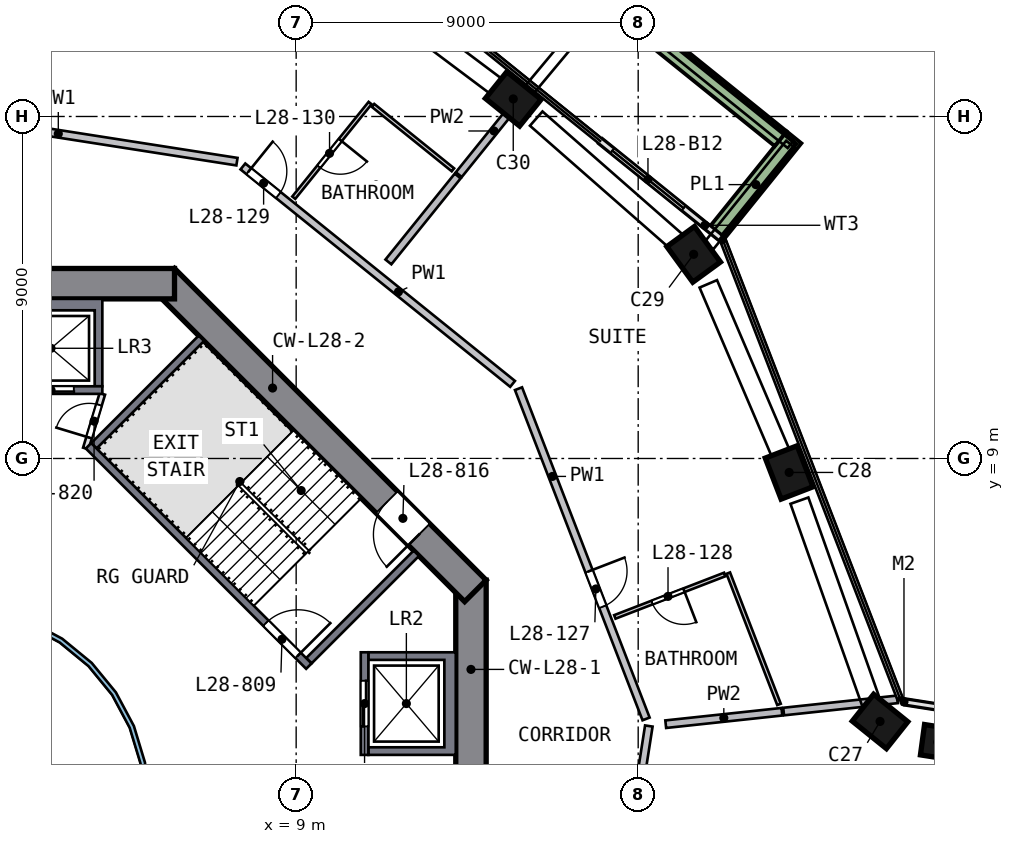
"""IFC4 building model, lengths in metres.
Left out: names, types, materials, properties, quantities, classifications, styles, units other than length and angle.
Written with IfcOpenShell. Run it as: python <this file> out.ifc"""

import sys

from ifc_helpers import new_model, si_unit, direction, frame, frame_2d, origin, origin_2d, place, context, subcontext, project, spatial, polyline, rectangle, outline, extrude, element, fill, save


model = new_model("IFC4")
c1 = context("Model", 3, precision=1e-05, world=origin(), true_north=direction((0.0, 1.0)))
c2 = subcontext(c1, "Body", "Model", "MODEL_VIEW")
j1 = project(units=[si_unit("LENGTHUNIT", "METRE"), si_unit("PLANEANGLEUNIT", "RADIAN")], contexts=[c1])
p1 = place(None, origin())
s1 = spatial("IfcSite", under=j1, at=p1, CompositionType="ELEMENT")
p2 = place(p1, origin())
s2 = spatial("IfcBuilding", under=s1, at=p2, CompositionType="ELEMENT")
p3 = place(p2, frame((0.0, 0.0, 118.5)))
s3 = spatial("IfcBuildingStorey", under=s2, at=p3, CompositionType="ELEMENT", Elevation=118.5)
p4 = place(p3, frame((26.07, 1.362, 0.0), z_axis=(-0.15242064, 0.14215314, 0.978039075), x_axis=(-0.976379461, 0.131678342, -0.171300796)))
e1 = element("IfcColumn", 1, at=p4, inside=s3, PredefinedType="COLUMN", context=c2, shape_type="SweptSolid", body=[
    extrude(rectangle(XDim=0.8, YDim=0.8, at=origin_2d()), origin(), (0.0, 0.0, 1.0), 3.067),
])
p5 = place(p3, frame((24.377, 1.94, 0.0), z_axis=(-0.01026508, 0.115906491, 0.993207085), x_axis=(0.780504995, -0.619955936, 0.080415116)))
e2 = element("IfcColumn", 2, at=p5, inside=s3, PredefinedType="COLUMN", context=c2, shape_type="SweptSolid", body=[
    extrude(rectangle(XDim=1.15, YDim=0.9, at=origin_2d()), origin(), (0.0, 0.0, 1.0), 3.021),
])
p6 = place(p3, frame((22.022, 8.507, 0.0), z_axis=(-0.041321986, 0.104477507, 0.993668428), x_axis=(-0.357606883, 0.927089617, -0.112348381)))
e3 = element("IfcColumn", 3, at=p6, inside=s3, PredefinedType="COLUMN", context=c2, shape_type="SweptSolid", body=[
    extrude(rectangle(XDim=1.15, YDim=0.9, at=origin_2d()), origin(), (0.0, 0.0, 1.0), 3.019),
])
p7 = place(p3, frame((19.542, 14.261, 0.0), z_axis=(-0.068632604, 0.092399372, 0.993353875), x_axis=(0.585531111, -0.80243765, 0.115096203)))
e4 = element("IfcColumn", 4, at=p7, inside=s3, PredefinedType="COLUMN", context=c2, shape_type="SweptSolid", body=[
    extrude(rectangle(XDim=1.15, YDim=0.9, at=origin_2d()), origin(), (0.0, 0.0, 1.0), 3.02),
])
p8 = place(p3, frame((14.819, 18.378, 0.0), z_axis=(-0.087981597, 0.069786874, 0.99367451), x_axis=(-0.773238231, 0.624093395, -0.11229458)))
e5 = element("IfcColumn", 5, at=p8, inside=s3, PredefinedType="COLUMN", context=c2, shape_type="SweptSolid", body=[
    extrude(rectangle(XDim=1.15, YDim=0.9, at=origin_2d()), origin(), (0.0, 0.0, 1.0), 3.019),
])
p9 = place(p3, frame((13.6, -5.799, 0.0), z_axis=(0.0, 0.0, 1.0), x_axis=(0.0, 1.0, 0.0)))
e6 = element("IfcWall", 6, at=p9, inside=s3, PredefinedType="SHEAR", context=c2, shape_type="SweptSolid", body=[
    extrude(rectangle(XDim=11.598, YDim=0.8, at=frame_2d((5.799, 0.0))), origin(), (0.0, 0.0, 1.0), 3.5),
])
p10 = place(p9, frame((4.899, 0.0, 0.0)))
e7 = element("IfcOpeningElement", 7, at=p10, cuts=e6, PredefinedType="OPENING", context=c2, shape_type="SweptSolid", body=[
    extrude(rectangle(XDim=1.8, YDim=2.1, at=frame_2d((0.9, 1.05))), frame((0.0, 0.41, 0.0), z_axis=(0.0, -1.0, 0.0), x_axis=(1.0, 0.0, 0.0)), (0.0, 0.0, 1.0), 0.82),
])
p11 = place(p3, frame((13.717, 5.516, 0.0), z_axis=(0.0, 0.0, 1.0), x_axis=(-0.707106781, 0.707106781, 0.0)))
e8 = element("IfcWall", 8, at=p11, inside=s3, PredefinedType="SHEAR", context=c2, shape_type="SweptSolid", body=[
    extrude(rectangle(XDim=11.598, YDim=0.8, at=frame_2d((5.799, 0.0))), origin(), (0.0, 0.0, 1.0), 3.5),
])
p12 = place(p11, frame((2.099, 0.0, 0.0)))
e9 = element("IfcOpeningElement", 9, at=p12, cuts=e8, PredefinedType="OPENING", context=c2, shape_type="SweptSolid", body=[
    extrude(rectangle(XDim=1.2, YDim=2.1, at=frame_2d((0.6, 1.05))), frame((0.0, 0.41, 0.0), z_axis=(0.0, -1.0, 0.0), x_axis=(1.0, 0.0, 0.0)), (0.0, 0.0, 1.0), 0.82),
])
p13 = place(p3, frame((5.799, 13.6, 0.0), z_axis=(0.0, 0.0, 1.0), x_axis=(-1.0, 0.0, 0.0)))
e10 = element("IfcWall", 10, at=p13, inside=s3, PredefinedType="SHEAR", context=c2, shape_type="SweptSolid", body=[
    extrude(rectangle(XDim=11.598, YDim=0.8, at=frame_2d((5.799, 0.0))), origin(), (0.0, 0.0, 1.0), 3.5),
])
p14 = place(p13, frame((4.899, 0.0, 0.0)))
e11 = element("IfcOpeningElement", 11, at=p14, cuts=e10, PredefinedType="OPENING", context=c2, shape_type="SweptSolid", body=[
    extrude(rectangle(XDim=1.8, YDim=2.1, at=frame_2d((0.9, 1.05))), frame((0.0, 0.41, 0.0), z_axis=(0.0, -1.0, 0.0), x_axis=(1.0, 0.0, 0.0)), (0.0, 0.0, 1.0), 0.82),
])
p15 = place(p3, frame((26.677, 2.335, 0.0), z_axis=(0.0, 0.0, 1.0), x_axis=(-0.988012034, 0.15437688, 0.0)))
e12 = element("IfcWall", 12, at=p15, inside=s3, PredefinedType="SOLIDWALL", context=c2, shape_type="SweptSolid", body=[
    extrude(rectangle(XDim=1.668, YDim=0.15, at=frame_2d((0.834, 0.0))), origin(), (0.0, 0.0, 1.0), 2.935),
])
p16 = place(p3, frame((20.162, 14.809, 0.0), z_axis=(0.0, 0.0, 1.0), x_axis=(-0.778437766, 0.627721789, 0.0)))
e13 = element("IfcWall", 13, at=p16, inside=s3, PredefinedType="SOLIDWALL", context=c2, shape_type="SweptSolid", body=[
    extrude(rectangle(XDim=4.046, YDim=0.15, at=frame_2d((2.023, 0.0))), origin(), (0.0, 0.0, 1.0), 2.935),
])
p17 = place(p16, frame((1.247, 0.0, 0.0)))
e14 = element("IfcOpeningElement", 14, at=p17, cuts=e13, PredefinedType="OPENING", context=c2, shape_type="SweptSolid", body=[
    extrude(rectangle(XDim=2.4, YDim=2.4, at=frame_2d((1.2, 1.2))), frame((0.0, 0.085, 0.0), z_axis=(0.0, -1.0, 0.0), x_axis=(1.0, 0.0, 0.0)), (0.0, 0.0, 1.0), 0.17),
])
p18 = place(p3, frame((20.093, 14.962, 0.0), z_axis=(0.0, 0.0, 1.0), x_axis=(0.627715158, 0.778443113, 0.0)))
e15 = element("IfcWall", 15, at=p18, inside=s3, PredefinedType="SOLIDWALL", context=c2, shape_type="SweptSolid", body=[
    extrude(rectangle(XDim=3.199, YDim=0.5, at=frame_2d((1.6, 0.0))), origin(), (0.0, 0.0, 1.0), 0.7),
])
p19 = place(p3, frame((21.749, 17.415, 0.0), z_axis=(0.0, 0.0, 1.0), x_axis=(-0.778460183, 0.627693988, 0.0)))
e16 = element("IfcWall", 16, at=p19, inside=s3, PredefinedType="SOLIDWALL", context=c2, shape_type="SweptSolid", body=[
    extrude(rectangle(XDim=13.223, YDim=0.5, at=frame_2d((6.612, 0.0))), origin(), (0.0, 0.0, 1.0), 0.7),
])
p20 = place(p3, origin())
e17 = element("IfcWall", 17, at=p20, inside=s3, PredefinedType="SOLIDWALL", context=c2, shape_type="SweptSolid", body=[
    extrude(outline(polyline([(13.2, 3.9), (13.2, 1.2), (10.9, 1.2), (10.9, 1.4), (12.9, 1.4), (12.9, 3.7), (10.9, 3.7), (10.9, 3.9), (13.2, 3.9)])), origin(), (0.0, 0.0, 1.0), 3.0),
])
p21 = place(p3, frame((10.8, 1.2, 0.0), z_axis=(0.0, 0.0, 1.0), x_axis=(0.0, 1.0, 0.0)))
e18 = element("IfcWall", 18, at=p21, inside=s3, PredefinedType="SOLIDWALL", context=c2, shape_type="SweptSolid", body=[
    extrude(rectangle(XDim=2.7, YDim=0.2, at=frame_2d((1.35, 0.0))), origin(), (0.0, 0.0, 1.0), 3.0),
])
p22 = place(p21, frame((0.75, 0.0, 0.0)))
e19 = element("IfcOpeningElement", 19, at=p22, cuts=e18, PredefinedType="OPENING", context=c2, shape_type="SweptSolid", body=[
    extrude(rectangle(XDim=1.2, YDim=2.1, at=frame_2d((0.6, 1.05))), frame((0.0, 0.11, 0.0), z_axis=(0.0, -1.0, 0.0), x_axis=(1.0, 0.0, 0.0)), (0.0, 0.0, 1.0), 0.22),
])
p23 = place(p3, origin())
e20 = element("IfcWall", 20, at=p23, inside=s3, PredefinedType="SOLIDWALL", context=c2, shape_type="SweptSolid", body=[
    extrude(outline(polyline([(3.9, 13.2), (3.9, 10.9), (3.7, 10.9), (3.7, 12.9), (1.4, 12.9), (1.4, 10.9), (1.2, 10.9), (1.2, 13.2), (3.9, 13.2)])), origin(), (0.0, 0.0, 1.0), 3.0),
])
p24 = place(p3, frame((1.2, 10.8, 0.0), z_axis=(0.0, 0.0, 1.0), x_axis=(1.0, 0.0, 0.0)))
e21 = element("IfcWall", 21, at=p24, inside=s3, PredefinedType="SOLIDWALL", context=c2, shape_type="SweptSolid", body=[
    extrude(rectangle(XDim=2.7, YDim=0.2, at=frame_2d((1.35, 0.0))), origin(), (0.0, 0.0, 1.0), 3.0),
])
p25 = place(p24, frame((0.75, 0.0, 0.0)))
e22 = element("IfcOpeningElement", 22, at=p25, cuts=e21, PredefinedType="OPENING", context=c2, shape_type="SweptSolid", body=[
    extrude(rectangle(XDim=1.2, YDim=2.1, at=frame_2d((0.6, 1.05))), frame((0.0, 0.11, 0.0), z_axis=(0.0, -1.0, 0.0), x_axis=(1.0, 0.0, 0.0)), (0.0, 0.0, 1.0), 0.22),
])
p26 = place(p3, frame((3.535, 9.334, 0.0), z_axis=(0.0, 0.0, 1.0), x_axis=(0.707106781, -0.707106781, 0.0)))
e23 = element("IfcWall", 23, at=p26, inside=s3, PredefinedType="SOLIDWALL", context=c2, shape_type="SweptSolid", body=[
    extrude(rectangle(XDim=8.2, YDim=0.2, at=frame_2d((4.1, 0.0))), origin(), (0.0, 0.0, 1.0), 3.0),
])
p27 = place(p26, frame((6.6, 0.0, 0.0)))
e24 = element("IfcOpeningElement", 24, at=p27, cuts=e23, PredefinedType="OPENING", context=c2, shape_type="SweptSolid", body=[
    extrude(rectangle(XDim=1.2, YDim=2.1, at=frame_2d((0.6, 1.05))), frame((0.0, 0.11, 0.0), z_axis=(0.0, -1.0, 0.0), x_axis=(1.0, 0.0, 0.0)), (0.0, 0.0, 1.0), 0.22),
])
for number, where, z_axis, x_axis in (
    (25, (9.334, 3.677, 0.0), (0.0, 0.0, 1.0), (0.707, 0.707, 0.0)),
    (26, (3.677, 9.334, 0.0), (0.0, 0.0, 1.0), (0.707, 0.707, 0.0)),
):
    element("IfcWall", number, at=place(p3, frame(where, z_axis=z_axis, x_axis=x_axis)), inside=s3, PredefinedType="SOLIDWALL", context=c2, shape_type="SweptSolid", body=[
        extrude(rectangle(XDim=4.0, YDim=0.2, at=frame_2d((2.0, 0.0))), origin(), (0.0, 0.0, 1.0), 3.0),
    ])
p28 = place(p3, frame((3.465, 9.263, 0.0), z_axis=(0.0, 0.0, 1.0), x_axis=(0.289808785, 0.957084567, 0.0)))
e27 = element("IfcWall", 27, at=p28, inside=s3, PredefinedType="PARTITIONING", context=c2, shape_type="SweptSolid", body=[
    extrude(rectangle(XDim=1.501, YDim=0.15, at=frame_2d((0.75, 0.0))), origin(), (0.0, 0.0, 1.0), 3.0),
])
p29 = place(p28, frame((0.301, 0.0, 0.0)))
e28 = element("IfcOpeningElement", 28, at=p29, cuts=e27, PredefinedType="OPENING", context=c2, shape_type="SweptSolid", body=[
    extrude(rectangle(XDim=0.9, YDim=2.1, at=frame_2d((0.45, 1.05))), frame((0.0, 0.085, 0.0), z_axis=(0.0, -1.0, 0.0), x_axis=(1.0, 0.0, 0.0)), (0.0, 0.0, 1.0), 0.17),
])
p30 = place(p3, origin())
e29 = element("IfcWall", 29, at=p30, inside=s3, PredefinedType="SOLIDWALL", context=c2, shape_type="SweptSolid", body=[
    extrude(outline(polyline([(5.021, -0.999), (4.73, -1.959), (4.257, -2.844), (3.62, -3.62), (2.844, -4.257), (1.959, -4.73), (0.999, -5.021), (0.0, -5.12), (-0.999, -5.021), (-1.959, -4.73), (-2.844, -4.257), (-3.62, -3.62), (-4.257, -2.844), (-4.73, -1.959), (-5.021, -0.999), (-5.12, 0.0), (-5.021, 0.999), (-4.73, 1.959), (-4.257, 2.844), (-3.62, 3.62), (-2.844, 4.257), (-1.959, 4.73), (-0.999, 5.021), (0.0, 5.12), (0.999, 5.021), (1.959, 4.73), (2.844, 4.257), (3.62, 3.62), (4.257, 2.844), (4.73, 1.959), (5.021, 0.999), (5.12, 0.0), (5.021, -0.999)]), holes=[polyline([(4.904, 0.976), (4.619, 1.913), (4.157, 2.778), (3.535, 3.535), (2.778, 4.157), (1.913, 4.619), (0.976, 4.904), (0.0, 5.0), (-0.976, 4.904), (-1.913, 4.619), (-2.778, 4.157), (-3.535, 3.535), (-4.157, 2.778), (-4.619, 1.913), (-4.904, 0.976), (-5.0, 0.0), (-4.904, -0.976), (-4.619, -1.913), (-4.157, -2.778), (-3.535, -3.535), (-2.778, -4.157), (-1.913, -4.619), (-0.976, -4.904), (0.0, -5.0), (0.976, -4.904), (1.913, -4.619), (2.778, -4.157), (3.535, -3.535), (4.157, -2.778), (4.619, -1.913), (4.904, -0.976), (5.0, 0.0), (4.904, 0.976)])]), origin(), (0.0, 0.0, 1.0), 3.0),
])
p31 = place(p3, frame((7.442, 16.811, 0.0), z_axis=(0.0, 0.0, 1.0), x_axis=(-0.988012767, 0.154372184, 0.0)))
e30 = element("IfcWall", 30, at=p31, inside=s3, PredefinedType="SOLIDWALL", context=c2, shape_type="SweptSolid", body=[
    extrude(rectangle(XDim=9.516, YDim=0.2, at=frame_2d((4.758, 0.0))), origin(), (0.0, 0.0, 1.0), 3.0),
])
p32 = place(p3, frame((7.599, 16.685, 0.0), z_axis=(0.0, 0.0, 1.0), x_axis=(0.778469608, -0.6276823, 0.0)))
e31 = element("IfcWall", 31, at=p32, inside=s3, PredefinedType="SOLIDWALL", context=c2, shape_type="SweptSolid", body=[
    extrude(rectangle(XDim=9.115, YDim=0.2, at=frame_2d((4.558, 0.0))), origin(), (0.0, 0.0, 1.0), 3.0),
])
p33 = place(p32, frame((0.2, 0.0, 0.0)))
e32 = element("IfcOpeningElement", 32, at=p33, cuts=e31, PredefinedType="OPENING", context=c2, shape_type="SweptSolid", body=[
    extrude(rectangle(XDim=1.0, YDim=2.1, at=frame_2d((0.5, 1.05))), frame((0.0, 0.11, 0.0), z_axis=(0.0, -1.0, 0.0), x_axis=(1.0, 0.0, 0.0)), (0.0, 0.0, 1.0), 0.22),
])
p34 = place(p3, frame((14.851, 10.837, 0.0), z_axis=(0.0, 0.0, 1.0), x_axis=(0.360330872, -0.932824562, 0.0)))
e33 = element("IfcWall", 33, at=p34, inside=s3, PredefinedType="SOLIDWALL", context=c2, shape_type="SweptSolid", body=[
    extrude(rectangle(XDim=9.316, YDim=0.2, at=frame_2d((4.658, 0.0))), origin(), (0.0, 0.0, 1.0), 3.0),
])
p35 = place(p34, frame((5.15, 0.0, 0.0)))
e34 = element("IfcOpeningElement", 34, at=p35, cuts=e33, PredefinedType="OPENING", context=c2, shape_type="SweptSolid", body=[
    extrude(rectangle(XDim=1.0, YDim=2.1, at=frame_2d((0.5, 1.05))), frame((0.0, 0.11, 0.0), z_axis=(0.0, -1.0, 0.0), x_axis=(1.0, 0.0, 0.0)), (0.0, 0.0, 1.0), 0.22),
])
p36 = place(p3, frame((17.746, -1.457, 0.0), z_axis=(0.0, 0.0, 1.0), x_axis=(0.154396263, 0.988009005, 0.0)))
e35 = element("IfcWall", 35, at=p36, inside=s3, PredefinedType="SOLIDWALL", context=c2, shape_type="SweptSolid", body=[
    extrude(rectangle(XDim=3.458, YDim=0.2, at=frame_2d((1.729, 0.0))), origin(), (0.0, 0.0, 1.0), 3.0),
])
p37 = place(p3, frame((11.427, 14.172, 0.0), z_axis=(0.0, 0.0, 1.0), x_axis=(0.62768345, 0.778468681, 0.0)))
e36 = element("IfcWall", 36, at=p37, inside=s3, PredefinedType="SOLIDWALL", context=c2, shape_type="SweptSolid", body=[
    extrude(rectangle(XDim=2.905, YDim=0.2, at=frame_2d((1.452, 0.0))), origin(), (0.0, 0.0, 1.0), 3.0),
])
p38 = place(p3, frame((13.28, 16.469, 0.0), z_axis=(0.0, 0.0, 1.0), x_axis=(0.627736285, 0.778426076, 0.0)))
e37 = element("IfcWall", 37, at=p38, inside=s3, PredefinedType="SOLIDWALL", context=c2, shape_type="SweptSolid", body=[
    extrude(rectangle(XDim=2.952, YDim=0.2, at=frame_2d((1.476, 0.0))), origin(), (0.0, 0.0, 1.0), 3.0),
])
p39 = place(p3, frame((18.725, 2.008, 0.0), z_axis=(0.0, 0.0, 1.0), x_axis=(0.994307051, 0.106552748, 0.0)))
e38 = element("IfcWall", 38, at=p39, inside=s3, PredefinedType="SOLIDWALL", context=c2, shape_type="SweptSolid", body=[
    extrude(rectangle(XDim=3.075, YDim=0.2, at=frame_2d((1.538, 0.0))), origin(), (0.0, 0.0, 1.0), 3.0),
])
p40 = place(p3, frame((21.827, 2.34, 0.0), z_axis=(0.0, 0.0, 1.0), x_axis=(0.994301484, 0.106604684, 0.0)))
e39 = element("IfcWall", 39, at=p40, inside=s3, PredefinedType="SOLIDWALL", context=c2, shape_type="SweptSolid", body=[
    extrude(rectangle(XDim=3.011, YDim=0.2, at=frame_2d((1.506, 0.0))), origin(), (0.0, 0.0, 1.0), 3.0),
])
p41 = place(p3, frame((10.946, 18.354, 0.0), z_axis=(0.0, 0.0, 1.0), x_axis=(-0.62769578, -0.778458739, 0.0)))
e40 = element("IfcWall", 40, at=p41, inside=s3, PredefinedType="PARTITIONING", context=c2, shape_type="SweptSolid", body=[
    extrude(rectangle(XDim=3.2, YDim=0.1, at=frame_2d((1.6, 0.0))), origin(), (0.0, 0.0, 1.0), 3.0),
])
p42 = place(p41, frame((1.25, 0.0, 0.0)))
e41 = element("IfcOpeningElement", 41, at=p42, cuts=e40, PredefinedType="OPENING", context=c2, shape_type="SweptSolid", body=[
    extrude(rectangle(XDim=0.9, YDim=2.1, at=frame_2d((0.45, 1.05))), frame((0.0, 0.06, 0.0), z_axis=(0.0, -1.0, 0.0), x_axis=(1.0, 0.0, 0.0)), (0.0, 0.0, 1.0), 0.12),
])
p43 = place(p3, frame((11.023, 18.291, 0.0), z_axis=(0.0, 0.0, 1.0), x_axis=(0.778445821, -0.6277118, 0.0)))
e42 = element("IfcWall", 42, at=p43, inside=s3, PredefinedType="PARTITIONING", context=c2, shape_type="SweptSolid", body=[
    extrude(rectangle(XDim=2.7, YDim=0.1, at=frame_2d((1.35, 0.0))), origin(), (0.0, 0.0, 1.0), 3.0),
])
p44 = place(p3, frame((20.277, 5.948, 0.0), z_axis=(0.0, 0.0, 1.0), x_axis=(-0.93283724, -0.360298048, 0.0)))
e43 = element("IfcWall", 43, at=p44, inside=s3, PredefinedType="PARTITIONING", context=c2, shape_type="SweptSolid", body=[
    extrude(rectangle(XDim=3.1, YDim=0.1, at=frame_2d((1.55, 0.0))), origin(), (0.0, 0.0, 1.0), 3.0),
])
p45 = place(p44, frame((1.15, 0.0, 0.0)))
e44 = element("IfcOpeningElement", 44, at=p45, cuts=e43, PredefinedType="OPENING", context=c2, shape_type="SweptSolid", body=[
    extrude(rectangle(XDim=0.9, YDim=2.1, at=frame_2d((0.45, 1.05))), frame((0.0, 0.06, 0.0), z_axis=(0.0, -1.0, 0.0), x_axis=(1.0, 0.0, 0.0)), (0.0, 0.0, 1.0), 0.12),
])
p46 = place(p3, frame((20.371, 5.984, 0.0), z_axis=(0.0, 0.0, 1.0), x_axis=(0.360330199, -0.932824822, 0.0)))
e45 = element("IfcWall", 45, at=p46, inside=s3, PredefinedType="PARTITIONING", context=c2, shape_type="SweptSolid", body=[
    extrude(rectangle(XDim=3.704, YDim=0.1, at=frame_2d((1.852, 0.0))), origin(), (0.0, 0.0, 1.0), 3.0),
])
p47 = place(p17, origin())
e46 = element("IfcDoor", 46, at=p47, inside=s3, OperationType="SLIDING_TO_LEFT", PredefinedType="DOOR", context=c2, shape_type="SweptSolid", body=[
    extrude(rectangle(XDim=2.4, YDim=2.4, at=frame_2d((1.2, 1.2))), frame((0.0, 0.025, 0.0), z_axis=(0.0, -1.0, 0.0), x_axis=(1.0, 0.0, 0.0)), (0.0, 0.0, 1.0), 0.05),
])
fill(e14, e46)
p48 = place(p22, origin())
e47 = element("IfcDoor", 47, at=p48, inside=s3, OperationType="DOUBLE_DOOR_SLIDING", PredefinedType="DOOR", context=c2, shape_type="SweptSolid", body=[
    extrude(rectangle(XDim=1.2, YDim=2.1, at=frame_2d((0.6, 1.05))), frame((0.0, 0.025, 0.0), z_axis=(0.0, -1.0, 0.0), x_axis=(1.0, 0.0, 0.0)), (0.0, 0.0, 1.0), 0.05),
])
fill(e19, e47)
p49 = place(p25, origin())
e48 = element("IfcDoor", 48, at=p49, inside=s3, OperationType="DOUBLE_DOOR_SLIDING", PredefinedType="DOOR", context=c2, shape_type="SweptSolid", body=[
    extrude(rectangle(XDim=1.2, YDim=2.1, at=frame_2d((0.6, 1.05))), frame((0.0, 0.025, 0.0), z_axis=(0.0, -1.0, 0.0), x_axis=(1.0, 0.0, 0.0)), (0.0, 0.0, 1.0), 0.05),
])
fill(e22, e48)
p50 = place(p27, origin())
e49 = element("IfcDoor", 49, at=p50, inside=s3, OperationType="SINGLE_SWING_RIGHT", PredefinedType="DOOR", context=c2, shape_type="SweptSolid", body=[
    extrude(rectangle(XDim=1.2, YDim=2.1, at=frame_2d((0.6, 1.05))), frame((0.0, 0.025, 0.0), z_axis=(0.0, -1.0, 0.0), x_axis=(1.0, 0.0, 0.0)), (0.0, 0.0, 1.0), 0.05),
])
fill(e24, e49)
p51 = place(p12, origin())
e50 = element("IfcDoor", 50, at=p51, inside=s3, OperationType="SINGLE_SWING_LEFT", PredefinedType="DOOR", context=c2, shape_type="SweptSolid", body=[
    extrude(rectangle(XDim=1.2, YDim=2.1, at=frame_2d((0.6, 1.05))), frame((0.0, 0.025, 0.0), z_axis=(0.0, -1.0, 0.0), x_axis=(1.0, 0.0, 0.0)), (0.0, 0.0, 1.0), 0.05),
])
fill(e9, e50)
p52 = place(p29, origin())
e51 = element("IfcDoor", 51, at=p52, inside=s3, OperationType="SINGLE_SWING_LEFT", PredefinedType="DOOR", context=c2, shape_type="SweptSolid", body=[
    extrude(rectangle(XDim=0.9, YDim=2.1, at=frame_2d((0.45, 1.05))), frame((0.0, 0.025, 0.0), z_axis=(0.0, -1.0, 0.0), x_axis=(1.0, 0.0, 0.0)), (0.0, 0.0, 1.0), 0.05),
])
fill(e28, e51)
p53 = place(p35, origin())
e52 = element("IfcDoor", 52, at=p53, inside=s3, OperationType="SINGLE_SWING_LEFT", PredefinedType="DOOR", context=c2, shape_type="SweptSolid", body=[
    extrude(rectangle(XDim=1.0, YDim=2.1, at=frame_2d((0.5, 1.05))), frame((0.0, 0.025, 0.0), z_axis=(0.0, -1.0, 0.0), x_axis=(1.0, 0.0, 0.0)), (0.0, 0.0, 1.0), 0.05),
])
fill(e34, e52)
p54 = place(p45, origin())
e53 = element("IfcDoor", 53, at=p54, inside=s3, OperationType="SINGLE_SWING_LEFT", PredefinedType="DOOR", context=c2, shape_type="SweptSolid", body=[
    extrude(rectangle(XDim=0.9, YDim=2.1, at=frame_2d((0.45, 1.05))), frame((0.0, 0.025, 0.0), z_axis=(0.0, -1.0, 0.0), x_axis=(1.0, 0.0, 0.0)), (0.0, 0.0, 1.0), 0.05),
])
fill(e44, e53)
p55 = place(p33, origin())
e54 = element("IfcDoor", 54, at=p55, inside=s3, OperationType="SINGLE_SWING_LEFT", PredefinedType="DOOR", context=c2, shape_type="SweptSolid", body=[
    extrude(rectangle(XDim=1.0, YDim=2.1, at=frame_2d((0.5, 1.05))), frame((0.0, 0.025, 0.0), z_axis=(0.0, -1.0, 0.0), x_axis=(1.0, 0.0, 0.0)), (0.0, 0.0, 1.0), 0.05),
])
fill(e32, e54)
p56 = place(p42, origin())
e55 = element("IfcDoor", 55, at=p56, inside=s3, OperationType="SINGLE_SWING_LEFT", PredefinedType="DOOR", context=c2, shape_type="SweptSolid", body=[
    extrude(rectangle(XDim=0.9, YDim=2.1, at=frame_2d((0.45, 1.05))), frame((0.0, 0.025, 0.0), z_axis=(0.0, -1.0, 0.0), x_axis=(1.0, 0.0, 0.0)), (0.0, 0.0, 1.0), 0.05),
])
fill(e41, e55)
save(model, sys.argv[1])
